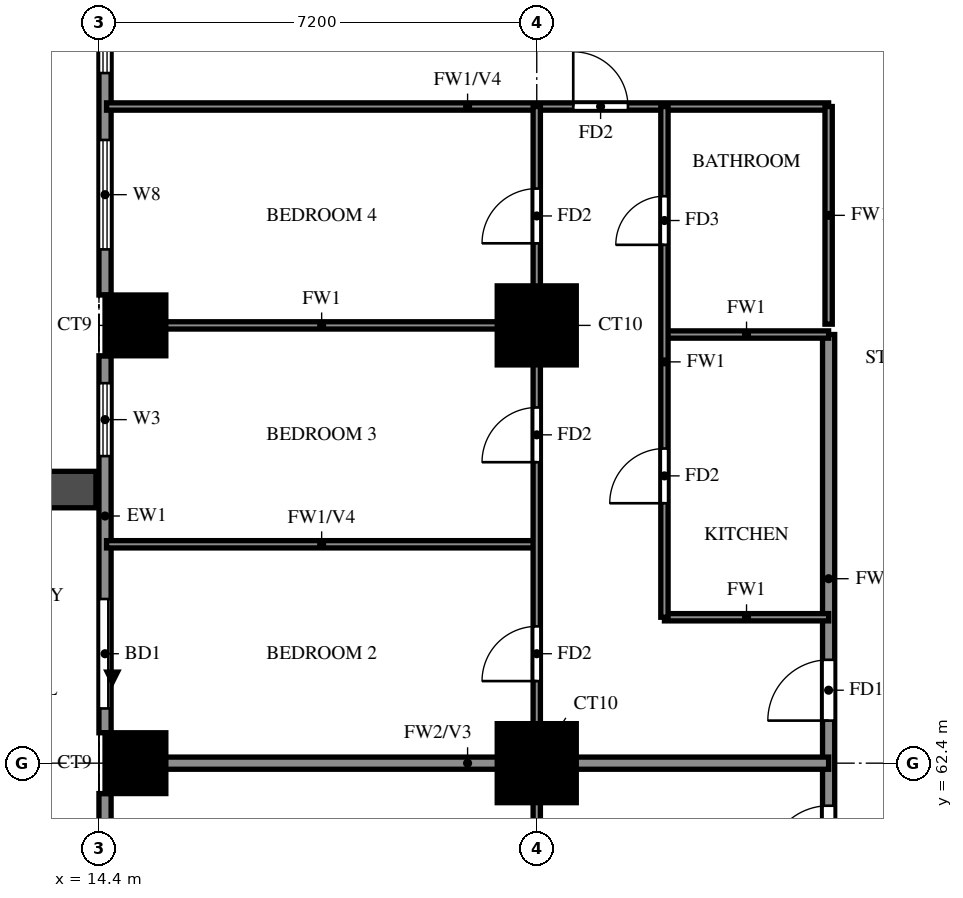
"""IFC4 building model, lengths in metres.
Left out: names, types, materials, properties, quantities, classifications, styles, units other than length and angle.
Written with IfcOpenShell. Run it as: python <this file> out.ifc"""

import sys

from ifc_helpers import new_model, si_unit, direction, frame, frame_2d, origin, origin_2d, place, context, subcontext, project, spatial, rectangle, extrude, source, transform, mapped, element, fill, save


model = new_model("IFC4")
c1 = context("Model", 3, precision=1e-05, world=origin(), true_north=direction((0.0, 1.0)))
c2 = subcontext(c1, "Body", "Model", "MODEL_VIEW")
j1 = project(units=[si_unit("LENGTHUNIT", "METRE"), si_unit("PLANEANGLEUNIT", "RADIAN")], contexts=[c1])
p1 = place(None, origin())
s1 = spatial("IfcSite", under=j1, at=p1, CompositionType="ELEMENT")
p2 = place(p1, origin())
s2 = spatial("IfcBuilding", under=s1, at=p2, CompositionType="ELEMENT")
p3 = place(p2, frame((0.0, 0.0, 76.0)))
s3 = spatial("IfcBuildingStorey", under=s2, at=p3, CompositionType="ELEMENT", Elevation=76.0)
m1 = source(origin(), c2, "Body", "SweptSolid", [
    extrude(rectangle(XDim=1.0, YDim=1.0, at=origin_2d()), origin(), (0.0, 0.0, 1.0), 3.18),
])
p4 = place(p3, frame((15.0, 62.4, 0.0), z_axis=(0.0, 0.0, 1.0), x_axis=(1.0, 0.0, 0.0)))
e1 = element("IfcColumn", 1, at=p4, inside=s3, PredefinedType="COLUMN", context=c2, shape_type="MappedRepresentation", body=[
    mapped(m1, transform((0.0, 0.0, 0.0))),
])
m2 = source(origin(), c2, "Body", "SweptSolid", [
    extrude(rectangle(XDim=1.3, YDim=1.3, at=origin_2d()), origin(), (0.0, 0.0, 1.0), 3.18),
])
p5 = place(p3, frame((21.6, 62.4, 0.0), z_axis=(0.0, 0.0, 1.0), x_axis=(1.0, 0.0, 0.0)))
e2 = element("IfcColumn", 2, at=p5, inside=s3, PredefinedType="COLUMN", context=c2, shape_type="MappedRepresentation", body=[
    mapped(m2, transform((0.0, 0.0, 0.0))),
])
p6 = place(p3, frame((15.0, 69.6, 0.0), z_axis=(0.0, 0.0, 1.0), x_axis=(1.0, 0.0, 0.0)))
e3 = element("IfcColumn", 3, at=p6, inside=s3, PredefinedType="COLUMN", context=c2, shape_type="MappedRepresentation", body=[
    mapped(m1, transform((0.0, 0.0, 0.0))),
])
p7 = place(p3, frame((21.6, 69.6, 0.0), z_axis=(0.0, 0.0, 1.0), x_axis=(1.0, 0.0, 0.0)))
e4 = element("IfcColumn", 4, at=p7, inside=s3, PredefinedType="COLUMN", context=c2, shape_type="MappedRepresentation", body=[
    mapped(m2, transform((0.0, 0.0, 0.0))),
])
p8 = place(p3, frame((14.5, 76.3, 0.0), z_axis=(0.0, 0.0, 1.0), x_axis=(0.0, -1.0, 0.0)))
e5 = element("IfcWall", 5, at=p8, inside=s3, PredefinedType="SOLIDWALL", context=c2, shape_type="SweptSolid", body=[
    extrude(rectangle(XDim=6.2, YDim=0.2, at=frame_2d((3.1, 0.0))), origin(), (0.0, 0.0, 1.0), 3.18),
])
p9 = place(p8, frame((3.65, 0.0, 0.6)))
e6 = element("IfcOpeningElement", 6, at=p9, cuts=e5, PredefinedType="OPENING", context=c2, shape_type="SweptSolid", body=[
    extrude(rectangle(XDim=1.8, YDim=2.4, at=frame_2d((0.9, 1.2))), frame((0.0, 0.11, 0.0), z_axis=(0.0, -1.0, 0.0), x_axis=(1.0, 0.0, 0.0)), (0.0, 0.0, 1.0), 0.22),
])
p10 = place(p8, frame((0.75, 0.0, 0.6)))
e7 = element("IfcOpeningElement", 7, at=p10, cuts=e5, PredefinedType="OPENING", context=c2, shape_type="SweptSolid", body=[
    extrude(rectangle(XDim=1.8, YDim=2.4, at=frame_2d((0.9, 1.2))), frame((0.0, 0.11, 0.0), z_axis=(0.0, -1.0, 0.0), x_axis=(1.0, 0.0, 0.0)), (0.0, 0.0, 1.0), 0.22),
])
p11 = place(p3, frame((14.5, 69.1, 0.0), z_axis=(0.0, 0.0, 1.0), x_axis=(0.0, -1.0, 0.0)))
e8 = element("IfcWall", 8, at=p11, inside=s3, PredefinedType="SOLIDWALL", context=c2, shape_type="SweptSolid", body=[
    extrude(rectangle(XDim=6.2, YDim=0.2, at=frame_2d((3.1, 0.0))), origin(), (0.0, 0.0, 1.0), 3.18),
])
p12 = place(p11, frame((4.0, 0.0, 0.0)))
e9 = element("IfcOpeningElement", 9, at=p12, cuts=e8, PredefinedType="OPENING", context=c2, shape_type="SweptSolid", body=[
    extrude(rectangle(XDim=1.8, YDim=2.4, at=frame_2d((0.9, 1.2))), frame((0.0, 0.11, 0.0), z_axis=(0.0, -1.0, 0.0), x_axis=(1.0, 0.0, 0.0)), (0.0, 0.0, 1.0), 0.22),
])
p13 = place(p11, frame((0.45, 0.0, 0.6)))
e10 = element("IfcOpeningElement", 10, at=p13, cuts=e8, PredefinedType="OPENING", context=c2, shape_type="SweptSolid", body=[
    extrude(rectangle(XDim=1.2, YDim=2.4, at=frame_2d((0.6, 1.2))), frame((0.0, 0.11, 0.0), z_axis=(0.0, -1.0, 0.0), x_axis=(1.0, 0.0, 0.0)), (0.0, 0.0, 1.0), 0.22),
])
p14 = place(p3, frame((14.5, 61.9, 0.0), z_axis=(0.0, 0.0, 1.0), x_axis=(0.0, -1.0, 0.0)))
e11 = element("IfcWall", 11, at=p14, inside=s3, PredefinedType="SOLIDWALL", context=c2, shape_type="SweptSolid", body=[
    extrude(rectangle(XDim=6.2, YDim=0.2, at=frame_2d((3.1, 0.0))), origin(), (0.0, 0.0, 1.0), 3.18),
])
p15 = place(p14, frame((3.65, 0.0, 0.6)))
e12 = element("IfcOpeningElement", 12, at=p15, cuts=e11, PredefinedType="OPENING", context=c2, shape_type="SweptSolid", body=[
    extrude(rectangle(XDim=1.8, YDim=2.4, at=frame_2d((0.9, 1.2))), frame((0.0, 0.11, 0.0), z_axis=(0.0, -1.0, 0.0), x_axis=(1.0, 0.0, 0.0)), (0.0, 0.0, 1.0), 0.22),
])
p16 = place(p14, frame((2.05, 0.0, 0.6)))
e13 = element("IfcOpeningElement", 13, at=p16, cuts=e11, PredefinedType="OPENING", context=c2, shape_type="SweptSolid", body=[
    extrude(rectangle(XDim=0.9, YDim=2.4, at=frame_2d((0.45, 1.2))), frame((0.0, 0.11, 0.0), z_axis=(0.0, -1.0, 0.0), x_axis=(1.0, 0.0, 0.0)), (0.0, 0.0, 1.0), 0.22),
])
p17 = place(p3, frame((14.35, 66.9, 0.0), z_axis=(0.0, 0.0, 1.0), x_axis=(-1.0, 0.0, 0.0)))
e14 = element("IfcWall", 14, at=p17, inside=s3, PredefinedType="SOLIDWALL", context=c2, shape_type="SweptSolid", body=[
    extrude(rectangle(XDim=2.65, YDim=0.6, at=frame_2d((1.325, 0.0))), origin(), (0.0, 0.0, 1.0), 2.85),
])
p18 = place(p3, frame((26.4, 60.0, 0.0), z_axis=(0.0, 0.0, 1.0), x_axis=(0.0, 1.0, 0.0)))
e15 = element("IfcWall", 15, at=p18, inside=s3, PredefinedType="SOLIDWALL", context=c2, shape_type="SweptSolid", body=[
    extrude(rectangle(XDim=9.45, YDim=0.2, at=frame_2d((4.725, 0.0))), origin(), (0.0, 0.0, 1.0), 3.18),
])
p19 = place(p18, frame((0.7, 0.0, 0.0)))
e16 = element("IfcOpeningElement", 16, at=p19, cuts=e15, PredefinedType="OPENING", context=c2, shape_type="SweptSolid", body=[
    extrude(rectangle(XDim=1.0, YDim=2.1, at=frame_2d((0.5, 1.05))), frame((0.0, 0.11, 0.0), z_axis=(0.0, -1.0, 0.0), x_axis=(1.0, 0.0, 0.0)), (0.0, 0.0, 1.0), 0.22),
])
p20 = place(p18, frame((3.1, 0.0, 0.0)))
e17 = element("IfcOpeningElement", 17, at=p20, cuts=e15, PredefinedType="OPENING", context=c2, shape_type="SweptSolid", body=[
    extrude(rectangle(XDim=1.0, YDim=2.1, at=frame_2d((0.5, 1.05))), frame((0.0, 0.11, 0.0), z_axis=(0.0, -1.0, 0.0), x_axis=(1.0, 0.0, 0.0)), (0.0, 0.0, 1.0), 0.22),
])
p21 = place(p3, frame((14.525, 62.4, 0.0), z_axis=(0.0, 0.0, 1.0), x_axis=(1.0, 0.0, 0.0)))
e18 = element("IfcWall", 18, at=p21, inside=s3, PredefinedType="SOLIDWALL", context=c2, shape_type="SweptSolid", body=[
    extrude(rectangle(XDim=11.875, YDim=0.2, at=frame_2d((5.938, 0.0))), origin(), (0.0, 0.0, 1.0), 3.18),
])
p22 = place(p3, frame((23.7, 64.8, 0.0), z_axis=(0.0, 0.0, 1.0), x_axis=(1.0, 0.0, 0.0)))
e19 = element("IfcWall", 19, at=p22, inside=s3, PredefinedType="PARTITIONING", context=c2, shape_type="SweptSolid", body=[
    extrude(rectangle(XDim=2.7, YDim=0.12, at=frame_2d((1.35, 0.0))), origin(), (0.0, 0.0, 1.0), 3.18),
])
p23 = place(p3, frame((14.525, 66.0, 0.0), z_axis=(0.0, 0.0, 1.0), x_axis=(1.0, 0.0, 0.0)))
e20 = element("IfcWall", 20, at=p23, inside=s3, PredefinedType="PARTITIONING", context=c2, shape_type="SweptSolid", body=[
    extrude(rectangle(XDim=7.075, YDim=0.12, at=frame_2d((3.538, 0.0))), origin(), (0.0, 0.0, 1.0), 2.28),
])
p24 = place(p3, frame((23.7, 69.45, 0.0), z_axis=(0.0, 0.0, 1.0), x_axis=(1.0, 0.0, 0.0)))
e21 = element("IfcWall", 21, at=p24, inside=s3, PredefinedType="PARTITIONING", context=c2, shape_type="SweptSolid", body=[
    extrude(rectangle(XDim=2.7, YDim=0.12, at=frame_2d((1.35, 0.0))), origin(), (0.0, 0.0, 1.0), 3.18),
])
p25 = place(p3, frame((14.525, 69.6, 0.0), z_axis=(0.0, 0.0, 1.0), x_axis=(1.0, 0.0, 0.0)))
e22 = element("IfcWall", 22, at=p25, inside=s3, PredefinedType="PARTITIONING", context=c2, shape_type="SweptSolid", body=[
    extrude(rectangle(XDim=7.075, YDim=0.12, at=frame_2d((3.538, 0.0))), origin(), (0.0, 0.0, 1.0), 3.18),
])
p26 = place(p3, frame((14.525, 73.2, 0.0), z_axis=(0.0, 0.0, 1.0), x_axis=(1.0, 0.0, 0.0)))
e23 = element("IfcWall", 23, at=p26, inside=s3, PredefinedType="PARTITIONING", context=c2, shape_type="SweptSolid", body=[
    extrude(rectangle(XDim=11.875, YDim=0.12, at=frame_2d((5.938, 0.0))), origin(), (0.0, 0.0, 1.0), 2.28),
])
p27 = place(p26, frame((7.675, 0.0, 0.0)))
e24 = element("IfcOpeningElement", 24, at=p27, cuts=e23, PredefinedType="OPENING", context=c2, shape_type="SweptSolid", body=[
    extrude(rectangle(XDim=0.9, YDim=2.1, at=frame_2d((0.45, 1.05))), frame((0.0, 0.07, 0.0), z_axis=(0.0, -1.0, 0.0), x_axis=(1.0, 0.0, 0.0)), (0.0, 0.0, 1.0), 0.14),
])
p28 = place(p3, frame((21.6, 33.725, 0.0), z_axis=(0.0, 0.0, 1.0), x_axis=(0.0, 1.0, 0.0)))
e25 = element("IfcWall", 25, at=p28, inside=s3, PredefinedType="PARTITIONING", context=c2, shape_type="SweptSolid", body=[
    extrude(rectangle(XDim=39.475, YDim=0.12, at=frame_2d((19.737, 0.0))), origin(), (0.0, 0.0, 1.0), 3.18),
])
p29 = place(p28, frame((7.775, 0.0, 0.0)))
e26 = element("IfcOpeningElement", 26, at=p29, cuts=e25, PredefinedType="OPENING", context=c2, shape_type="SweptSolid", body=[
    extrude(rectangle(XDim=0.9, YDim=2.1, at=frame_2d((0.45, 1.05))), frame((0.0, 0.07, 0.0), z_axis=(0.0, -1.0, 0.0), x_axis=(1.0, 0.0, 0.0)), (0.0, 0.0, 1.0), 0.14),
])
p30 = place(p28, frame((17.125, 0.0, 0.0)))
e27 = element("IfcOpeningElement", 27, at=p30, cuts=e25, PredefinedType="OPENING", context=c2, shape_type="SweptSolid", body=[
    extrude(rectangle(XDim=1.5, YDim=2.1, at=frame_2d((0.75, 1.05))), frame((0.0, 0.07, 0.0), z_axis=(0.0, -1.0, 0.0), x_axis=(1.0, 0.0, 0.0)), (0.0, 0.0, 1.0), 0.14),
])
p31 = place(p28, frame((22.825, 0.0, 0.0)))
e28 = element("IfcOpeningElement", 28, at=p31, cuts=e25, PredefinedType="OPENING", context=c2, shape_type="SweptSolid", body=[
    extrude(rectangle(XDim=0.9, YDim=2.1, at=frame_2d((0.45, 1.05))), frame((0.0, 0.07, 0.0), z_axis=(0.0, -1.0, 0.0), x_axis=(1.0, 0.0, 0.0)), (0.0, 0.0, 1.0), 0.14),
])
p32 = place(p28, frame((26.425, 0.0, 0.0)))
e29 = element("IfcOpeningElement", 29, at=p32, cuts=e25, PredefinedType="OPENING", context=c2, shape_type="SweptSolid", body=[
    extrude(rectangle(XDim=0.9, YDim=2.1, at=frame_2d((0.45, 1.05))), frame((0.0, 0.07, 0.0), z_axis=(0.0, -1.0, 0.0), x_axis=(1.0, 0.0, 0.0)), (0.0, 0.0, 1.0), 0.14),
])
p33 = place(p28, frame((30.025, 0.0, 0.0)))
e30 = element("IfcOpeningElement", 30, at=p33, cuts=e25, PredefinedType="OPENING", context=c2, shape_type="SweptSolid", body=[
    extrude(rectangle(XDim=0.9, YDim=2.1, at=frame_2d((0.45, 1.05))), frame((0.0, 0.07, 0.0), z_axis=(0.0, -1.0, 0.0), x_axis=(1.0, 0.0, 0.0)), (0.0, 0.0, 1.0), 0.14),
])
p34 = place(p28, frame((33.625, 0.0, 0.0)))
e31 = element("IfcOpeningElement", 31, at=p34, cuts=e25, PredefinedType="OPENING", context=c2, shape_type="SweptSolid", body=[
    extrude(rectangle(XDim=0.9, YDim=2.1, at=frame_2d((0.45, 1.05))), frame((0.0, 0.07, 0.0), z_axis=(0.0, -1.0, 0.0), x_axis=(1.0, 0.0, 0.0)), (0.0, 0.0, 1.0), 0.14),
])
p35 = place(p28, frame((37.225, 0.0, 0.0)))
e32 = element("IfcOpeningElement", 32, at=p35, cuts=e25, PredefinedType="OPENING", context=c2, shape_type="SweptSolid", body=[
    extrude(rectangle(XDim=0.9, YDim=2.1, at=frame_2d((0.45, 1.05))), frame((0.0, 0.07, 0.0), z_axis=(0.0, -1.0, 0.0), x_axis=(1.0, 0.0, 0.0)), (0.0, 0.0, 1.0), 0.14),
])
p36 = place(p3, frame((23.7, 64.8, 0.0), z_axis=(0.0, 0.0, 1.0), x_axis=(0.0, 1.0, 0.0)))
e33 = element("IfcWall", 33, at=p36, inside=s3, PredefinedType="PARTITIONING", context=c2, shape_type="SweptSolid", body=[
    extrude(rectangle(XDim=8.4, YDim=0.12, at=frame_2d((4.2, 0.0))), origin(), (0.0, 0.0, 1.0), 3.18),
])
p37 = place(p36, frame((1.875, 0.0, 0.0)))
e34 = element("IfcOpeningElement", 34, at=p37, cuts=e33, PredefinedType="OPENING", context=c2, shape_type="SweptSolid", body=[
    extrude(rectangle(XDim=0.9, YDim=2.1, at=frame_2d((0.45, 1.05))), frame((0.0, 0.07, 0.0), z_axis=(0.0, -1.0, 0.0), x_axis=(1.0, 0.0, 0.0)), (0.0, 0.0, 1.0), 0.14),
])
p38 = place(p36, frame((6.125, 0.0, 0.0)))
e35 = element("IfcOpeningElement", 35, at=p38, cuts=e33, PredefinedType="OPENING", context=c2, shape_type="SweptSolid", body=[
    extrude(rectangle(XDim=0.8, YDim=2.1, at=frame_2d((0.4, 1.05))), frame((0.0, 0.07, 0.0), z_axis=(0.0, -1.0, 0.0), x_axis=(1.0, 0.0, 0.0)), (0.0, 0.0, 1.0), 0.14),
])
p39 = place(p3, frame((26.4, 69.62, 0.0), z_axis=(0.0, 0.0, 1.0), x_axis=(0.0, 1.0, 0.0)))
e36 = element("IfcWall", 36, at=p39, inside=s3, PredefinedType="PARTITIONING", context=c2, shape_type="SweptSolid", body=[
    extrude(rectangle(XDim=3.58, YDim=0.12, at=frame_2d((1.79, 0.0))), origin(), (0.0, 0.0, 1.0), 3.18),
])
p40 = place(p9, origin())
e37 = element("IfcWindow", 37, at=p40, inside=s3, PartitioningType="DOUBLE_PANEL_VERTICAL", PredefinedType="WINDOW", context=c2, shape_type="SweptSolid", body=[
    extrude(rectangle(XDim=1.8, YDim=2.4, at=frame_2d((0.9, 1.2))), frame((0.0, 0.03, 0.0), z_axis=(0.0, -1.0, 0.0), x_axis=(1.0, 0.0, 0.0)), (0.0, 0.0, 1.0), 0.06),
])
fill(e6, e37)
p41 = place(p10, origin())
e38 = element("IfcWindow", 38, at=p41, inside=s3, PartitioningType="DOUBLE_PANEL_VERTICAL", PredefinedType="WINDOW", context=c2, shape_type="SweptSolid", body=[
    extrude(rectangle(XDim=1.8, YDim=2.4, at=frame_2d((0.9, 1.2))), frame((0.0, 0.03, 0.0), z_axis=(0.0, -1.0, 0.0), x_axis=(1.0, 0.0, 0.0)), (0.0, 0.0, 1.0), 0.06),
])
fill(e7, e38)
p42 = place(p12, origin())
e39 = element("IfcDoor", 39, at=p42, inside=s3, OperationType="DOUBLE_DOOR_SLIDING", PredefinedType="DOOR", context=c2, shape_type="SweptSolid", body=[
    extrude(rectangle(XDim=1.8, YDim=2.4, at=frame_2d((0.9, 1.2))), frame((0.0, 0.025, 0.0), z_axis=(0.0, -1.0, 0.0), x_axis=(1.0, 0.0, 0.0)), (0.0, 0.0, 1.0), 0.05),
])
fill(e9, e39)
p43 = place(p13, origin())
e40 = element("IfcWindow", 40, at=p43, inside=s3, PartitioningType="SINGLE_PANEL", PredefinedType="WINDOW", context=c2, shape_type="SweptSolid", body=[
    extrude(rectangle(XDim=1.2, YDim=2.4, at=frame_2d((0.6, 1.2))), frame((0.0, 0.03, 0.0), z_axis=(0.0, -1.0, 0.0), x_axis=(1.0, 0.0, 0.0)), (0.0, 0.0, 1.0), 0.06),
])
fill(e10, e40)
p44 = place(p19, origin())
e41 = element("IfcDoor", 41, at=p44, inside=s3, OperationType="SINGLE_SWING_LEFT", PredefinedType="DOOR", context=c2, shape_type="SweptSolid", body=[
    extrude(rectangle(XDim=1.0, YDim=2.1, at=frame_2d((0.5, 1.05))), frame((0.0, 0.025, 0.0), z_axis=(0.0, -1.0, 0.0), x_axis=(1.0, 0.0, 0.0)), (0.0, 0.0, 1.0), 0.05),
])
fill(e16, e41)
p45 = place(p20, origin())
e42 = element("IfcDoor", 42, at=p45, inside=s3, OperationType="SINGLE_SWING_LEFT", PredefinedType="DOOR", context=c2, shape_type="SweptSolid", body=[
    extrude(rectangle(XDim=1.0, YDim=2.1, at=frame_2d((0.5, 1.05))), frame((0.0, 0.025, 0.0), z_axis=(0.0, -1.0, 0.0), x_axis=(1.0, 0.0, 0.0)), (0.0, 0.0, 1.0), 0.05),
])
fill(e17, e42)
p46 = place(p33, origin())
e43 = element("IfcDoor", 43, at=p46, inside=s3, OperationType="SINGLE_SWING_RIGHT", PredefinedType="DOOR", context=c2, shape_type="SweptSolid", body=[
    extrude(rectangle(XDim=0.9, YDim=2.1, at=frame_2d((0.45, 1.05))), frame((0.0, 0.025, 0.0), z_axis=(0.0, -1.0, 0.0), x_axis=(1.0, 0.0, 0.0)), (0.0, 0.0, 1.0), 0.05),
])
fill(e30, e43)
p47 = place(p34, origin())
e44 = element("IfcDoor", 44, at=p47, inside=s3, OperationType="SINGLE_SWING_LEFT", PredefinedType="DOOR", context=c2, shape_type="SweptSolid", body=[
    extrude(rectangle(XDim=0.9, YDim=2.1, at=frame_2d((0.45, 1.05))), frame((0.0, 0.025, 0.0), z_axis=(0.0, -1.0, 0.0), x_axis=(1.0, 0.0, 0.0)), (0.0, 0.0, 1.0), 0.05),
])
fill(e31, e44)
p48 = place(p35, origin())
e45 = element("IfcDoor", 45, at=p48, inside=s3, OperationType="SINGLE_SWING_LEFT", PredefinedType="DOOR", context=c2, shape_type="SweptSolid", body=[
    extrude(rectangle(XDim=0.9, YDim=2.1, at=frame_2d((0.45, 1.05))), frame((0.0, 0.025, 0.0), z_axis=(0.0, -1.0, 0.0), x_axis=(1.0, 0.0, 0.0)), (0.0, 0.0, 1.0), 0.05),
])
fill(e32, e45)
p49 = place(p27, origin())
e46 = element("IfcDoor", 46, at=p49, inside=s3, OperationType="SINGLE_SWING_RIGHT", PredefinedType="DOOR", context=c2, shape_type="SweptSolid", body=[
    extrude(rectangle(XDim=0.9, YDim=2.1, at=frame_2d((0.45, 1.05))), frame((0.0, 0.025, 0.0), z_axis=(0.0, -1.0, 0.0), x_axis=(1.0, 0.0, 0.0)), (0.0, 0.0, 1.0), 0.05),
])
fill(e24, e46)
p50 = place(p37, origin())
e47 = element("IfcDoor", 47, at=p50, inside=s3, OperationType="SINGLE_SWING_LEFT", PredefinedType="DOOR", context=c2, shape_type="SweptSolid", body=[
    extrude(rectangle(XDim=0.9, YDim=2.1, at=frame_2d((0.45, 1.05))), frame((0.0, 0.025, 0.0), z_axis=(0.0, -1.0, 0.0), x_axis=(1.0, 0.0, 0.0)), (0.0, 0.0, 1.0), 0.05),
])
fill(e34, e47)
p51 = place(p38, origin())
e48 = element("IfcDoor", 48, at=p51, inside=s3, OperationType="SINGLE_SWING_LEFT", PredefinedType="DOOR", context=c2, shape_type="SweptSolid", body=[
    extrude(rectangle(XDim=0.8, YDim=2.1, at=frame_2d((0.4, 1.05))), frame((0.0, 0.025, 0.0), z_axis=(0.0, -1.0, 0.0), x_axis=(1.0, 0.0, 0.0)), (0.0, 0.0, 1.0), 0.05),
])
fill(e35, e48)
save(model, sys.argv[1])
